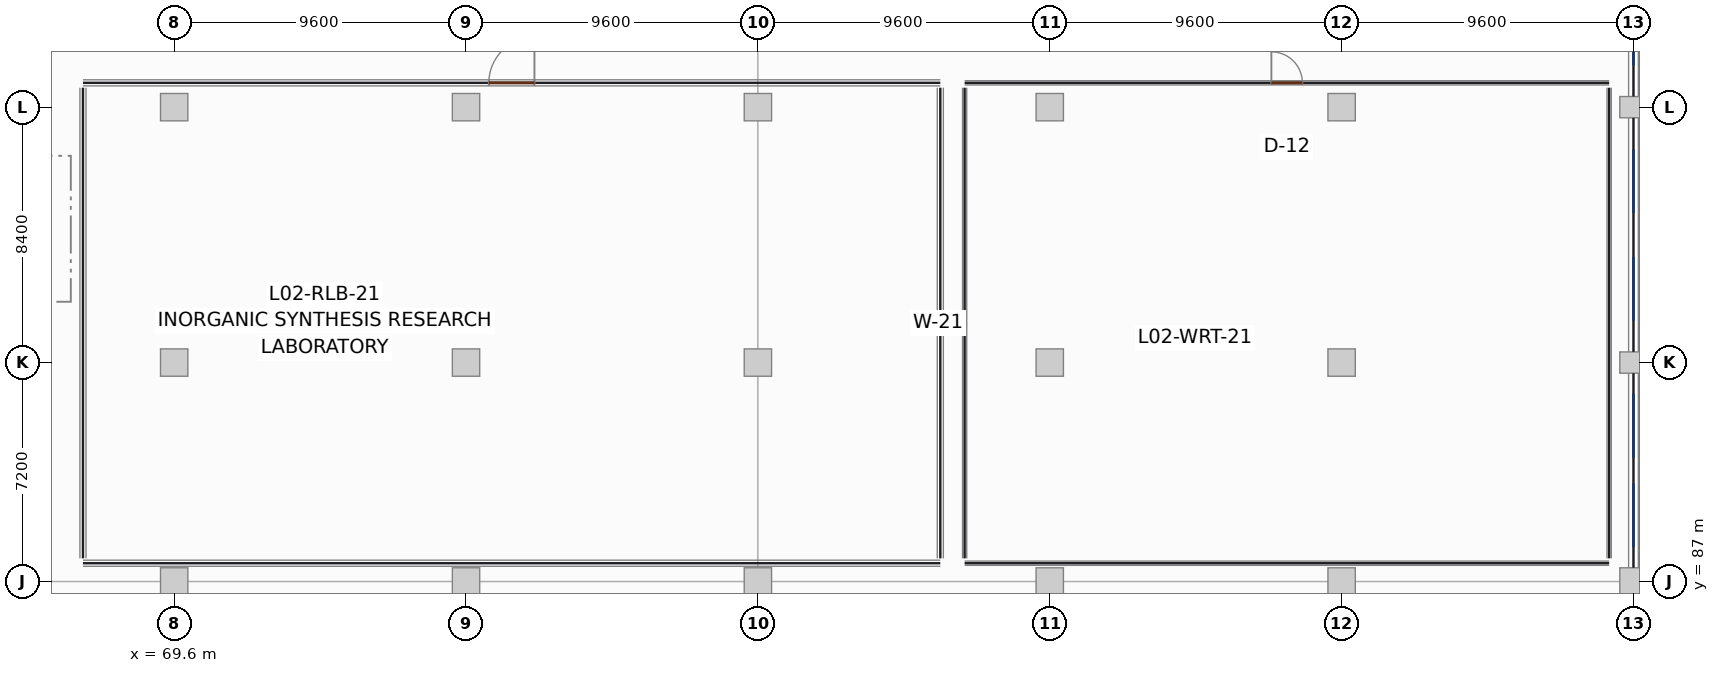
"""IFC4 building model, lengths in metres.
Left out: names, types, materials, properties, quantities, classifications, styles, units other than length and angle.
Written with IfcOpenShell. Run it as: python <this file> out.ifc"""

import sys

from ifc_helpers import new_model, si_unit, direction, frame, frame_2d, origin, origin_2d, place, context, subcontext, project, spatial, rectangle, extrude, element, fill, save


model = new_model("IFC4")
c1 = context("Model", 3, precision=1e-05, world=origin(), true_north=direction((0.0, 1.0)))
c2 = subcontext(c1, "Body", "Model", "MODEL_VIEW")
j1 = project(units=[si_unit("LENGTHUNIT", "METRE"), si_unit("PLANEANGLEUNIT", "RADIAN")], contexts=[c1])
p1 = place(None, origin())
s1 = spatial("IfcSite", under=j1, at=p1, CompositionType="ELEMENT")
p2 = place(p1, origin())
s2 = spatial("IfcBuilding", under=s1, at=p2, CompositionType="ELEMENT")
p3 = place(p2, frame((0.0, 0.0, 9.9)))
s3 = spatial("IfcBuildingStorey", under=s2, at=p3, CompositionType="ELEMENT", Elevation=9.9)
for number, where, z_axis, x_axis in (
    (1, (69.6, 87.0, 0.0), (0.0, 0.0, 1.0), (1.0, 0.0, 0.0)),
    (2, (69.6, 94.2, 0.0), (0.0, 0.0, 1.0), (1.0, 0.0, 0.0)),
    (3, (69.6, 102.6, 0.0), (0.0, 0.0, 1.0), (1.0, 0.0, 0.0)),
    (4, (79.2, 87.0, 0.0), (0.0, 0.0, 1.0), (1.0, 0.0, 0.0)),
    (5, (79.2, 94.2, 0.0), (0.0, 0.0, 1.0), (1.0, 0.0, 0.0)),
    (6, (79.2, 102.6, 0.0), (0.0, 0.0, 1.0), (1.0, 0.0, 0.0)),
    (7, (88.8, 87.0, 0.0), (0.0, 0.0, 1.0), (1.0, 0.0, 0.0)),
    (8, (88.8, 94.2, 0.0), (0.0, 0.0, 1.0), (1.0, 0.0, 0.0)),
    (9, (88.8, 102.6, 0.0), (0.0, 0.0, 1.0), (1.0, 0.0, 0.0)),
    (10, (98.4, 87.0, 0.0), (0.0, 0.0, 1.0), (1.0, 0.0, 0.0)),
    (11, (98.4, 94.2, 0.0), (0.0, 0.0, 1.0), (1.0, 0.0, 0.0)),
    (12, (98.4, 102.6, 0.0), (0.0, 0.0, 1.0), (1.0, 0.0, 0.0)),
    (13, (108.0, 87.0, 0.0), (0.0, 0.0, 1.0), (1.0, 0.0, 0.0)),
    (14, (108.0, 94.2, 0.0), (0.0, 0.0, 1.0), (1.0, 0.0, 0.0)),
    (15, (108.0, 102.6, 0.0), (0.0, 0.0, 1.0), (1.0, 0.0, 0.0)),
    (16, (117.6, 87.0, 0.0), (0.0, 0.0, 1.0), (1.0, 0.0, 0.0)),
):
    element("IfcColumn", number, at=place(p3, frame(where, z_axis=z_axis, x_axis=x_axis)), inside=s3, PredefinedType="COLUMN", context=c2, shape_type="SweptSolid", body=[
        extrude(rectangle(XDim=0.9, YDim=0.9, at=origin_2d()), origin(), (0.0, 0.0, 1.0), 3.9),
    ])
for number, where, z_axis, x_axis in (
    (17, (117.6, 94.2, 0.0), (0.0, 0.0, 1.0), (1.0, 0.0, 0.0)),
    (18, (117.6, 102.6, 0.0), (0.0, 0.0, 1.0), (1.0, 0.0, 0.0)),
):
    element("IfcColumn", number, at=place(p3, frame(where, z_axis=z_axis, x_axis=x_axis)), inside=s3, PredefinedType="COLUMN", context=c2, shape_type="SweptSolid", body=[
        extrude(rectangle(XDim=0.9, YDim=0.7, at=origin_2d()), origin(), (0.0, 0.0, 1.0), 3.9),
    ])
p4 = place(p3, frame((117.6, 87.452, 0.0), z_axis=(0.0, 0.0, 1.0), x_axis=(0.0, 1.0, 0.0)))
e19 = element("IfcWall", 19, at=p4, inside=s3, PredefinedType="SOLIDWALL", context=c2, shape_type="SweptSolid", body=[
    extrude(rectangle(XDim=6.396, YDim=0.32, at=frame_2d((3.198, 0.0))), origin(), (0.0, 0.0, 1.0), 3.08),
])
p5 = place(p4, frame((0.677, 0.0, 0.85)))
e20 = element("IfcOpeningElement", 20, at=p5, cuts=e19, PredefinedType="OPENING", context=c2, shape_type="SweptSolid", body=[
    extrude(rectangle(XDim=2.1, YDim=1.95, at=frame_2d((1.05, 0.975))), frame((0.0, 0.17, 0.0), z_axis=(0.0, -1.0, 0.0), x_axis=(1.0, 0.0, 0.0)), (0.0, 0.0, 1.0), 0.34),
])
p6 = place(p4, frame((3.619, 0.0, 0.85)))
e21 = element("IfcOpeningElement", 21, at=p6, cuts=e19, PredefinedType="OPENING", context=c2, shape_type="SweptSolid", body=[
    extrude(rectangle(XDim=2.1, YDim=1.95, at=frame_2d((1.05, 0.975))), frame((0.0, 0.17, 0.0), z_axis=(0.0, -1.0, 0.0), x_axis=(1.0, 0.0, 0.0)), (0.0, 0.0, 1.0), 0.34),
])
p7 = place(p3, frame((117.6, 94.552, 0.0), z_axis=(0.0, 0.0, 1.0), x_axis=(0.0, 1.0, 0.0)))
e22 = element("IfcWall", 22, at=p7, inside=s3, PredefinedType="SOLIDWALL", context=c2, shape_type="SweptSolid", body=[
    extrude(rectangle(XDim=7.696, YDim=0.32, at=frame_2d((3.848, 0.0))), origin(), (0.0, 0.0, 1.0), 3.08),
])
p8 = place(p7, frame((1.028, 0.0, 0.85)))
e23 = element("IfcOpeningElement", 23, at=p8, cuts=e22, PredefinedType="OPENING", context=c2, shape_type="SweptSolid", body=[
    extrude(rectangle(XDim=2.1, YDim=1.95, at=frame_2d((1.05, 0.975))), frame((0.0, 0.17, 0.0), z_axis=(0.0, -1.0, 0.0), x_axis=(1.0, 0.0, 0.0)), (0.0, 0.0, 1.0), 0.34),
])
p9 = place(p7, frame((4.568, 0.0, 0.85)))
e24 = element("IfcOpeningElement", 24, at=p9, cuts=e22, PredefinedType="OPENING", context=c2, shape_type="SweptSolid", body=[
    extrude(rectangle(XDim=2.1, YDim=1.95, at=frame_2d((1.05, 0.975))), frame((0.0, 0.17, 0.0), z_axis=(0.0, -1.0, 0.0), x_axis=(1.0, 0.0, 0.0)), (0.0, 0.0, 1.0), 0.34),
])
p10 = place(p3, frame((117.6, 102.952, 0.0), z_axis=(0.0, 0.0, 1.0), x_axis=(0.0, 1.0, 0.0)))
e25 = element("IfcWall", 25, at=p10, inside=s3, PredefinedType="SOLIDWALL", context=c2, shape_type="SweptSolid", body=[
    extrude(rectangle(XDim=7.696, YDim=0.32, at=frame_2d((3.848, 0.0))), origin(), (0.0, 0.0, 1.0), 3.08),
])
p11 = place(p10, frame((1.028, 0.0, 0.85)))
e26 = element("IfcOpeningElement", 26, at=p11, cuts=e25, PredefinedType="OPENING", context=c2, shape_type="SweptSolid", body=[
    extrude(rectangle(XDim=2.1, YDim=1.95, at=frame_2d((1.05, 0.975))), frame((0.0, 0.17, 0.0), z_axis=(0.0, -1.0, 0.0), x_axis=(1.0, 0.0, 0.0)), (0.0, 0.0, 1.0), 0.34),
])
p12 = place(p10, frame((4.568, 0.0, 0.85)))
e27 = element("IfcOpeningElement", 27, at=p12, cuts=e25, PredefinedType="OPENING", context=c2, shape_type="SweptSolid", body=[
    extrude(rectangle(XDim=2.1, YDim=1.95, at=frame_2d((1.05, 0.975))), frame((0.0, 0.17, 0.0), z_axis=(0.0, -1.0, 0.0), x_axis=(1.0, 0.0, 0.0)), (0.0, 0.0, 1.0), 0.34),
])
p13 = place(p3, frame((66.6, 87.6, 0.0), z_axis=(0.0, 0.0, 1.0), x_axis=(1.0, 0.0, 0.0)))
e28 = element("IfcWall", 28, at=p13, inside=s3, PredefinedType="PARTITIONING", context=c2, shape_type="SweptSolid", body=[
    extrude(rectangle(XDim=28.2, YDim=0.2, at=frame_2d((14.1, 0.0))), origin(), (0.0, 0.0, 1.0), 2.92),
])
p14 = place(p3, frame((66.6, 103.4, 0.0), z_axis=(0.0, 0.0, 1.0), x_axis=(1.0, 0.0, 0.0)))
e29 = element("IfcWall", 29, at=p14, inside=s3, PredefinedType="PARTITIONING", context=c2, shape_type="SweptSolid", body=[
    extrude(rectangle(XDim=28.2, YDim=0.2, at=frame_2d((14.1, 0.0))), origin(), (0.0, 0.0, 1.0), 2.92),
])
p15 = place(p14, frame((13.35, 0.0, 0.0)))
e30 = element("IfcOpeningElement", 30, at=p15, cuts=e29, PredefinedType="OPENING", context=c2, shape_type="SweptSolid", body=[
    extrude(rectangle(XDim=1.5, YDim=2.2, at=frame_2d((0.75, 1.1))), frame((0.0, 0.11, 0.0), z_axis=(0.0, -1.0, 0.0), x_axis=(1.0, 0.0, 0.0)), (0.0, 0.0, 1.0), 0.22),
])
for number, where, z_axis, x_axis in (
    (31, (66.6, 87.76, 0.0), (0.0, 0.0, 1.0), (0.0, 1.0, 0.0)),
    (32, (94.8, 87.76, 0.0), (0.0, 0.0, 1.0), (0.0, 1.0, 0.0)),
):
    element("IfcWall", number, at=place(p3, frame(where, z_axis=z_axis, x_axis=x_axis)), inside=s3, PredefinedType="PARTITIONING", context=c2, shape_type="SweptSolid", body=[
        extrude(rectangle(XDim=15.48, YDim=0.2, at=frame_2d((7.74, 0.0))), origin(), (0.0, 0.0, 1.0), 2.92),
    ])
p16 = place(p3, frame((95.6, 87.6, 0.0), z_axis=(0.0, 0.0, 1.0), x_axis=(1.0, 0.0, 0.0)))
e33 = element("IfcWall", 33, at=p16, inside=s3, PredefinedType="PARTITIONING", context=c2, shape_type="SweptSolid", body=[
    extrude(rectangle(XDim=21.2, YDim=0.14, at=frame_2d((10.6, 0.0))), origin(), (0.0, 0.0, 1.0), 2.92),
])
p17 = place(p3, frame((95.6, 103.4, 0.0), z_axis=(0.0, 0.0, 1.0), x_axis=(1.0, 0.0, 0.0)))
e34 = element("IfcWall", 34, at=p17, inside=s3, PredefinedType="PARTITIONING", context=c2, shape_type="SweptSolid", body=[
    extrude(rectangle(XDim=21.2, YDim=0.14, at=frame_2d((10.6, 0.0))), origin(), (0.0, 0.0, 1.0), 2.92),
])
p18 = place(p17, frame((10.09, 0.0, 0.0)))
e35 = element("IfcOpeningElement", 35, at=p18, cuts=e34, PredefinedType="OPENING", context=c2, shape_type="SweptSolid", body=[
    extrude(rectangle(XDim=1.02, YDim=2.2, at=frame_2d((0.51, 1.1))), frame((0.0, 0.08, 0.0), z_axis=(0.0, -1.0, 0.0), x_axis=(1.0, 0.0, 0.0)), (0.0, 0.0, 1.0), 0.16),
])
for number, where, z_axis, x_axis in (
    (36, (95.6, 87.76, 0.0), (0.0, 0.0, 1.0), (0.0, 1.0, 0.0)),
    (37, (116.8, 87.76, 0.0), (0.0, 0.0, 1.0), (0.0, 1.0, 0.0)),
):
    element("IfcWall", number, at=place(p3, frame(where, z_axis=z_axis, x_axis=x_axis)), inside=s3, PredefinedType="PARTITIONING", context=c2, shape_type="SweptSolid", body=[
        extrude(rectangle(XDim=15.48, YDim=0.14, at=frame_2d((7.74, 0.0))), origin(), (0.0, 0.0, 1.0), 2.92),
    ])
p19 = place(p5, origin())
e38 = element("IfcWindow", 38, at=p19, inside=s3, PartitioningType="SINGLE_PANEL", PredefinedType="WINDOW", context=c2, shape_type="SweptSolid", body=[
    extrude(rectangle(XDim=2.1, YDim=1.95, at=frame_2d((1.05, 0.975))), frame((0.0, 0.03, 0.0), z_axis=(0.0, -1.0, 0.0), x_axis=(1.0, 0.0, 0.0)), (0.0, 0.0, 1.0), 0.06),
])
fill(e20, e38)
p20 = place(p6, origin())
e39 = element("IfcWindow", 39, at=p20, inside=s3, PartitioningType="SINGLE_PANEL", PredefinedType="WINDOW", context=c2, shape_type="SweptSolid", body=[
    extrude(rectangle(XDim=2.1, YDim=1.95, at=frame_2d((1.05, 0.975))), frame((0.0, 0.03, 0.0), z_axis=(0.0, -1.0, 0.0), x_axis=(1.0, 0.0, 0.0)), (0.0, 0.0, 1.0), 0.06),
])
fill(e21, e39)
p21 = place(p8, origin())
e40 = element("IfcWindow", 40, at=p21, inside=s3, PartitioningType="SINGLE_PANEL", PredefinedType="WINDOW", context=c2, shape_type="SweptSolid", body=[
    extrude(rectangle(XDim=2.1, YDim=1.95, at=frame_2d((1.05, 0.975))), frame((0.0, 0.03, 0.0), z_axis=(0.0, -1.0, 0.0), x_axis=(1.0, 0.0, 0.0)), (0.0, 0.0, 1.0), 0.06),
])
fill(e23, e40)
p22 = place(p9, origin())
e41 = element("IfcWindow", 41, at=p22, inside=s3, PartitioningType="SINGLE_PANEL", PredefinedType="WINDOW", context=c2, shape_type="SweptSolid", body=[
    extrude(rectangle(XDim=2.1, YDim=1.95, at=frame_2d((1.05, 0.975))), frame((0.0, 0.03, 0.0), z_axis=(0.0, -1.0, 0.0), x_axis=(1.0, 0.0, 0.0)), (0.0, 0.0, 1.0), 0.06),
])
fill(e24, e41)
p23 = place(p11, origin())
e42 = element("IfcWindow", 42, at=p23, inside=s3, PartitioningType="SINGLE_PANEL", PredefinedType="WINDOW", context=c2, shape_type="SweptSolid", body=[
    extrude(rectangle(XDim=2.1, YDim=1.95, at=frame_2d((1.05, 0.975))), frame((0.0, 0.03, 0.0), z_axis=(0.0, -1.0, 0.0), x_axis=(1.0, 0.0, 0.0)), (0.0, 0.0, 1.0), 0.06),
])
fill(e26, e42)
p24 = place(p15, origin())
e43 = element("IfcDoor", 43, at=p24, inside=s3, OperationType="SINGLE_SWING_RIGHT", PredefinedType="DOOR", context=c2, shape_type="SweptSolid", body=[
    extrude(rectangle(XDim=1.5, YDim=2.2, at=frame_2d((0.75, 1.1))), frame((0.0, 0.025, 0.0), z_axis=(0.0, -1.0, 0.0), x_axis=(1.0, 0.0, 0.0)), (0.0, 0.0, 1.0), 0.05),
])
fill(e30, e43)
p25 = place(p18, origin())
e44 = element("IfcDoor", 44, at=p25, inside=s3, OperationType="SINGLE_SWING_LEFT", PredefinedType="DOOR", context=c2, shape_type="SweptSolid", body=[
    extrude(rectangle(XDim=1.02, YDim=2.2, at=frame_2d((0.51, 1.1))), frame((0.0, 0.025, 0.0), z_axis=(0.0, -1.0, 0.0), x_axis=(1.0, 0.0, 0.0)), (0.0, 0.0, 1.0), 0.05),
])
fill(e35, e44)
save(model, sys.argv[1])
